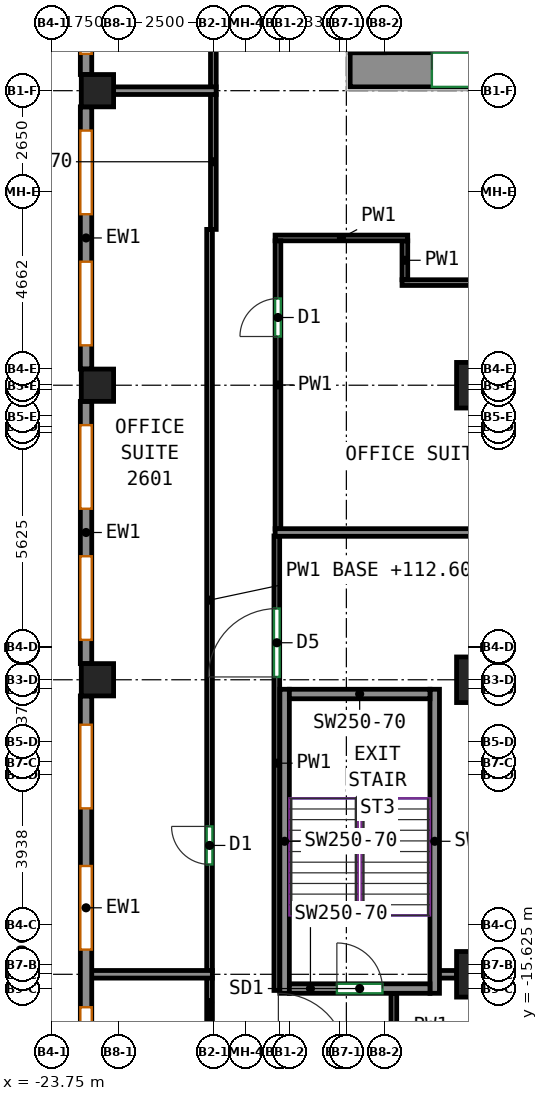
"""IFC4 building model, lengths in metres.
Left out: names, types, materials, properties, quantities, classifications, styles, units other than length and angle.
Written with IfcOpenShell. Run it as: python <this file> out.ifc"""

import sys

from ifc_helpers import new_model, si_unit, direction, frame, frame_2d, origin, origin_2d, place, context, subcontext, project, spatial, rectangle, extrude, source, transform, mapped, element, fill, save


model = new_model("IFC4")
c1 = context("Model", 3, precision=1e-05, world=origin(), true_north=direction((0.0, 1.0)))
c2 = subcontext(c1, "Body", "Model", "MODEL_VIEW")
j1 = project(units=[si_unit("LENGTHUNIT", "METRE"), si_unit("PLANEANGLEUNIT", "RADIAN")], contexts=[c1])
p1 = place(None, origin())
s1 = spatial("IfcSite", under=j1, at=p1, CompositionType="ELEMENT")
p2 = place(p1, origin())
s2 = spatial("IfcBuilding", under=s1, at=p2, CompositionType="ELEMENT")
p3 = place(p2, frame((0.0, 0.0, 112.6)))
s3 = spatial("IfcBuildingStorey", under=s2, at=p3, CompositionType="ELEMENT", Elevation=112.6)
m1 = source(origin(), c2, "Body", "SweptSolid", [
    extrude(rectangle(XDim=0.85, YDim=0.85, at=origin_2d()), origin(), (0.0, 0.0, 1.0), 3.72),
])
for number, where, z_axis, x_axis in (
    (1, (-22.55, -7.5, 0.0), (0.0, 0.0, 1.0), (1.0, 0.0, 0.0)),
    (2, (-22.55, 0.25, 0.0), (0.0, 0.0, 1.0), (1.0, 0.0, 0.0)),
    (3, (-22.55, 8.0, 0.0), (0.0, 0.0, 1.0), (1.0, 0.0, 0.0)),
):
    element("IfcColumn", number, at=place(p3, frame(where, z_axis=z_axis, x_axis=x_axis)), inside=s3, PredefinedType="COLUMN", context=c2, shape_type="MappedRepresentation", body=[
        mapped(m1, transform((0.0, 0.0, 0.0))),
    ])
m2 = source(origin(), c2, "Body", "SweptSolid", [
    extrude(rectangle(XDim=1.2, YDim=1.2, at=origin_2d()), origin(), (0.0, 0.0, 1.0), 3.72),
])
for number, where, z_axis, x_axis in (
    (4, (-12.5, -15.25, 0.0), (0.0, 0.0, 1.0), (1.0, 0.0, 0.0)),
    (5, (-12.5, -7.5, 0.0), (0.0, 0.0, 1.0), (1.0, 0.0, 0.0)),
    (6, (-12.5, 0.25, 0.0), (0.0, 0.0, 1.0), (1.0, 0.0, 0.0)),
):
    element("IfcColumn", number, at=place(p3, frame(where, z_axis=z_axis, x_axis=x_axis)), inside=s3, PredefinedType="COLUMN", context=c2, shape_type="MappedRepresentation", body=[
        mapped(m2, transform((0.0, 0.0, 0.0))),
    ])
m3 = source(origin(), c2, "Body", "SweptSolid", [
    extrude(rectangle(XDim=5.53, YDim=0.9, at=frame_2d((2.765, 0.0))), origin(), (0.0, 0.0, 1.0), 3.72),
])
p4 = place(p3, frame((-15.9, 8.55, 0.0), z_axis=(0.0, 0.0, 1.0), x_axis=(1.0, 0.0, 0.0)))
e7 = element("IfcWall", 7, at=p4, inside=s3, PredefinedType="SHEAR", context=c2, shape_type="MappedRepresentation", body=[
    mapped(m3, transform((0.0, 0.0, 0.0))),
])
p5 = place(p4, frame((2.15, 0.0, 0.0)))
e8 = element("IfcOpeningElement", 8, at=p5, cuts=e7, PredefinedType="OPENING", context=c2, shape_type="SweptSolid", body=[
    extrude(rectangle(XDim=1.2, YDim=2.1, at=frame_2d((0.6, 1.05))), frame((0.0, 0.46, 0.0), z_axis=(0.0, -1.0, 0.0), x_axis=(1.0, 0.0, 0.0)), (0.0, 0.0, 1.0), 0.92),
])
m4 = source(origin(), c2, "Body", "SweptSolid", [
    extrude(rectangle(XDim=8.0, YDim=0.25, at=frame_2d((4.0, 0.0))), origin(), (0.0, 0.0, 1.0), 3.72),
])
for number, where, z_axis, x_axis in (
    (9, (-17.625, -15.75, 0.0), (0.0, 0.0, 1.0), (0.0, 1.0, 0.0)),
    (10, (-13.675, -15.75, 0.0), (0.0, 0.0, 1.0), (0.0, 1.0, 0.0)),
):
    element("IfcWall", number, at=place(p3, frame(where, z_axis=z_axis, x_axis=x_axis)), inside=s3, PredefinedType="SHEAR", context=c2, shape_type="MappedRepresentation", body=[
        mapped(m4, transform((0.0, 0.0, 0.0))),
    ])
m5 = source(origin(), c2, "Body", "SweptSolid", [
    extrude(rectangle(XDim=3.7, YDim=0.25, at=frame_2d((1.85, 0.0))), origin(), (0.0, 0.0, 1.0), 3.72),
])
p6 = place(p3, frame((-17.5, -15.625, 0.0), z_axis=(0.0, 0.0, 1.0), x_axis=(1.0, 0.0, 0.0)))
e11 = element("IfcWall", 11, at=p6, inside=s3, PredefinedType="SHEAR", context=c2, shape_type="MappedRepresentation", body=[
    mapped(m5, transform((0.0, 0.0, 0.0))),
])
p7 = place(p6, frame((1.25, 0.0, 0.0)))
e12 = element("IfcOpeningElement", 12, at=p7, cuts=e11, PredefinedType="OPENING", context=c2, shape_type="SweptSolid", body=[
    extrude(rectangle(XDim=1.2, YDim=2.1, at=frame_2d((0.6, 1.05))), frame((0.0, 0.135, 0.0), z_axis=(0.0, -1.0, 0.0), x_axis=(1.0, 0.0, 0.0)), (0.0, 0.0, 1.0), 0.27),
])
p8 = place(p3, frame((-17.5, -7.875, 0.0), z_axis=(0.0, 0.0, 1.0), x_axis=(1.0, 0.0, 0.0)))
e13 = element("IfcWall", 13, at=p8, inside=s3, PredefinedType="SHEAR", context=c2, shape_type="MappedRepresentation", body=[
    mapped(m5, transform((0.0, 0.0, 0.0))),
])
m6 = source(origin(), c2, "Body", "SweptSolid", [
    extrude(rectangle(XDim=13.15, YDim=0.3, at=frame_2d((6.575, 0.0))), origin(), (0.0, 0.0, 1.0), 3.72),
])
p9 = place(p3, frame((-22.85, 21.575, 0.0), z_axis=(0.0, 0.0, 1.0), x_axis=(0.0, -1.0, 0.0)))
e14 = element("IfcWall", 14, at=p9, inside=s3, PredefinedType="SOLIDWALL", context=c2, shape_type="MappedRepresentation", body=[
    mapped(m6, transform((0.0, 0.0, 0.0))),
])
p10 = place(p9, frame((0.544, 0.0, 0.7)))
e15 = element("IfcOpeningElement", 15, at=p10, cuts=e14, PredefinedType="OPENING", context=c2, shape_type="SweptSolid", body=[
    extrude(rectangle(XDim=2.2, YDim=2.25, at=frame_2d((1.1, 1.125))), frame((0.0, 0.16, 0.0), z_axis=(0.0, -1.0, 0.0), x_axis=(1.0, 0.0, 0.0)), (0.0, 0.0, 1.0), 0.32),
])
p11 = place(p9, frame((3.831, 0.0, 0.7)))
e16 = element("IfcOpeningElement", 16, at=p11, cuts=e14, PredefinedType="OPENING", context=c2, shape_type="SweptSolid", body=[
    extrude(rectangle(XDim=2.2, YDim=2.25, at=frame_2d((1.1, 1.125))), frame((0.0, 0.16, 0.0), z_axis=(0.0, -1.0, 0.0), x_axis=(1.0, 0.0, 0.0)), (0.0, 0.0, 1.0), 0.32),
])
p12 = place(p9, frame((7.119, 0.0, 0.7)))
e17 = element("IfcOpeningElement", 17, at=p12, cuts=e14, PredefinedType="OPENING", context=c2, shape_type="SweptSolid", body=[
    extrude(rectangle(XDim=2.2, YDim=2.25, at=frame_2d((1.1, 1.125))), frame((0.0, 0.16, 0.0), z_axis=(0.0, -1.0, 0.0), x_axis=(1.0, 0.0, 0.0)), (0.0, 0.0, 1.0), 0.32),
])
p13 = place(p9, frame((10.406, 0.0, 0.7)))
e18 = element("IfcOpeningElement", 18, at=p13, cuts=e14, PredefinedType="OPENING", context=c2, shape_type="SweptSolid", body=[
    extrude(rectangle(XDim=2.2, YDim=2.25, at=frame_2d((1.1, 1.125))), frame((0.0, 0.16, 0.0), z_axis=(0.0, -1.0, 0.0), x_axis=(1.0, 0.0, 0.0)), (0.0, 0.0, 1.0), 0.32),
])
m7 = source(origin(), c2, "Body", "SweptSolid", [
    extrude(rectangle(XDim=6.9, YDim=0.3, at=frame_2d((3.45, 0.0))), origin(), (0.0, 0.0, 1.0), 3.72),
])
p14 = place(p3, frame((-22.85, 7.575, 0.0), z_axis=(0.0, 0.0, 1.0), x_axis=(0.0, -1.0, 0.0)))
e19 = element("IfcWall", 19, at=p14, inside=s3, PredefinedType="SOLIDWALL", context=c2, shape_type="MappedRepresentation", body=[
    mapped(m7, transform((0.0, 0.0, 0.0))),
])
p15 = place(p14, frame((0.625, 0.0, 0.7)))
e20 = element("IfcOpeningElement", 20, at=p15, cuts=e19, PredefinedType="OPENING", context=c2, shape_type="SweptSolid", body=[
    extrude(rectangle(XDim=2.2, YDim=2.25, at=frame_2d((1.1, 1.125))), frame((0.0, 0.16, 0.0), z_axis=(0.0, -1.0, 0.0), x_axis=(1.0, 0.0, 0.0)), (0.0, 0.0, 1.0), 0.32),
])
p16 = place(p14, frame((4.075, 0.0, 0.7)))
e21 = element("IfcOpeningElement", 21, at=p16, cuts=e19, PredefinedType="OPENING", context=c2, shape_type="SweptSolid", body=[
    extrude(rectangle(XDim=2.2, YDim=2.25, at=frame_2d((1.1, 1.125))), frame((0.0, 0.16, 0.0), z_axis=(0.0, -1.0, 0.0), x_axis=(1.0, 0.0, 0.0)), (0.0, 0.0, 1.0), 0.32),
])
p17 = place(p3, frame((-22.85, -0.175, 0.0), z_axis=(0.0, 0.0, 1.0), x_axis=(0.0, -1.0, 0.0)))
e22 = element("IfcWall", 22, at=p17, inside=s3, PredefinedType="SOLIDWALL", context=c2, shape_type="MappedRepresentation", body=[
    mapped(m7, transform((0.0, 0.0, 0.0))),
])
p18 = place(p17, frame((0.625, 0.0, 0.7)))
e23 = element("IfcOpeningElement", 23, at=p18, cuts=e22, PredefinedType="OPENING", context=c2, shape_type="SweptSolid", body=[
    extrude(rectangle(XDim=2.2, YDim=2.25, at=frame_2d((1.1, 1.125))), frame((0.0, 0.16, 0.0), z_axis=(0.0, -1.0, 0.0), x_axis=(1.0, 0.0, 0.0)), (0.0, 0.0, 1.0), 0.32),
])
p19 = place(p17, frame((4.075, 0.0, 0.7)))
e24 = element("IfcOpeningElement", 24, at=p19, cuts=e22, PredefinedType="OPENING", context=c2, shape_type="SweptSolid", body=[
    extrude(rectangle(XDim=2.2, YDim=2.25, at=frame_2d((1.1, 1.125))), frame((0.0, 0.16, 0.0), z_axis=(0.0, -1.0, 0.0), x_axis=(1.0, 0.0, 0.0)), (0.0, 0.0, 1.0), 0.32),
])
m8 = source(origin(), c2, "Body", "SweptSolid", [
    extrude(rectangle(XDim=11.15, YDim=0.3, at=frame_2d((5.575, 0.0))), origin(), (0.0, 0.0, 1.0), 3.72),
])
p20 = place(p3, frame((-22.85, -7.925, 0.0), z_axis=(0.0, 0.0, 1.0), x_axis=(0.0, -1.0, 0.0)))
e25 = element("IfcWall", 25, at=p20, inside=s3, PredefinedType="SOLIDWALL", context=c2, shape_type="MappedRepresentation", body=[
    mapped(m8, transform((0.0, 0.0, 0.0))),
])
p21 = place(p20, frame((0.758, 0.0, 0.7)))
e26 = element("IfcOpeningElement", 26, at=p21, cuts=e25, PredefinedType="OPENING", context=c2, shape_type="SweptSolid", body=[
    extrude(rectangle(XDim=2.2, YDim=2.25, at=frame_2d((1.1, 1.125))), frame((0.0, 0.16, 0.0), z_axis=(0.0, -1.0, 0.0), x_axis=(1.0, 0.0, 0.0)), (0.0, 0.0, 1.0), 0.32),
])
p22 = place(p20, frame((4.475, 0.0, 0.7)))
e27 = element("IfcOpeningElement", 27, at=p22, cuts=e25, PredefinedType="OPENING", context=c2, shape_type="SweptSolid", body=[
    extrude(rectangle(XDim=2.2, YDim=2.25, at=frame_2d((1.1, 1.125))), frame((0.0, 0.16, 0.0), z_axis=(0.0, -1.0, 0.0), x_axis=(1.0, 0.0, 0.0)), (0.0, 0.0, 1.0), 0.32),
])
p23 = place(p20, frame((8.192, 0.0, 0.7)))
e28 = element("IfcOpeningElement", 28, at=p23, cuts=e25, PredefinedType="OPENING", context=c2, shape_type="SweptSolid", body=[
    extrude(rectangle(XDim=2.2, YDim=2.25, at=frame_2d((1.1, 1.125))), frame((0.0, 0.16, 0.0), z_axis=(0.0, -1.0, 0.0), x_axis=(1.0, 0.0, 0.0)), (0.0, 0.0, 1.0), 0.32),
])
p24 = place(p3, frame((-19.6, -15.16, 0.0), z_axis=(0.0, 0.0, 1.0), x_axis=(0.0, 1.0, 0.0)))
e29 = element("IfcWall", 29, at=p24, inside=s3, PredefinedType="PARTITIONING", context=c2, shape_type="SweptSolid", body=[
    extrude(rectangle(XDim=19.51, YDim=0.15, at=frame_2d((9.755, 0.0))), origin(), (0.0, 0.0, 1.0), 3.07),
])
p25 = place(p24, frame((2.801, 0.0, 0.0)))
e30 = element("IfcOpeningElement", 30, at=p25, cuts=e29, PredefinedType="OPENING", context=c2, shape_type="SweptSolid", body=[
    extrude(rectangle(XDim=1.0, YDim=2.1, at=frame_2d((0.5, 1.05))), frame((0.0, 0.085, 0.0), z_axis=(0.0, -1.0, 0.0), x_axis=(1.0, 0.0, 0.0)), (0.0, 0.0, 1.0), 0.17),
])
p26 = place(p3, frame((-19.5, 4.35, 0.0), z_axis=(0.0, 0.0, 1.0), x_axis=(0.0, 1.0, 0.0)))
e31 = element("IfcWall", 31, at=p26, inside=s3, PredefinedType="PARTITIONING", context=c2, shape_type="SweptSolid", body=[
    extrude(rectangle(XDim=3.56, YDim=0.15, at=frame_2d((1.78, 0.0))), origin(), (0.0, 0.0, 1.0), 3.07),
])
p27 = place(p3, frame((-14.535, 2.95, 0.0), z_axis=(0.0, 0.0, 1.0), x_axis=(1.0, 0.0, 0.0)))
e32 = element("IfcWall", 32, at=p27, inside=s3, PredefinedType="PARTITIONING", context=c2, shape_type="SweptSolid", body=[
    extrude(rectangle(XDim=12.635, YDim=0.15, at=frame_2d((6.317, 0.0))), origin(), (0.0, 0.0, 1.0), 3.72),
])
p28 = place(p27, frame((10.333, 0.0, 0.0)))
e33 = element("IfcOpeningElement", 33, at=p28, cuts=e32, PredefinedType="OPENING", context=c2, shape_type="SweptSolid", body=[
    extrude(rectangle(XDim=0.9, YDim=2.1, at=frame_2d((0.45, 1.05))), frame((0.0, 0.085, 0.0), z_axis=(0.0, -1.0, 0.0), x_axis=(1.0, 0.0, 0.0)), (0.0, 0.0, 1.0), 0.17),
])
p29 = place(p3, frame((-14.46, 4.05, 0.0), z_axis=(0.0, 0.0, 1.0), x_axis=(0.0, -1.0, 0.0)))
e34 = element("IfcWall", 34, at=p29, inside=s3, PredefinedType="PARTITIONING", context=c2, shape_type="SweptSolid", body=[
    extrude(rectangle(XDim=1.025, YDim=0.15, at=frame_2d((0.513, 0.0))), origin(), (0.0, 0.0, 1.0), 3.72),
])
p30 = place(p3, frame((-17.875, 4.125, 0.0), z_axis=(0.0, 0.0, 1.0), x_axis=(1.0, 0.0, 0.0)))
e35 = element("IfcWall", 35, at=p30, inside=s3, PredefinedType="PARTITIONING", context=c2, shape_type="SweptSolid", body=[
    extrude(rectangle(XDim=3.49, YDim=0.15, at=frame_2d((1.745, 0.0))), origin(), (0.0, 0.0, 1.0), 3.72),
])
p31 = place(p3, frame((-17.8, -3.535, 0.0), z_axis=(0.0, 0.0, 1.0), x_axis=(0.0, 1.0, 0.0)))
e36 = element("IfcWall", 36, at=p31, inside=s3, PredefinedType="PARTITIONING", context=c2, shape_type="SweptSolid", body=[
    extrude(rectangle(XDim=7.585, YDim=0.15, at=frame_2d((3.792, 0.0))), origin(), (0.0, 0.0, 1.0), 3.72),
])
p32 = place(p31, frame((5.067, 0.0, 0.0)))
e37 = element("IfcOpeningElement", 37, at=p32, cuts=e36, PredefinedType="OPENING", context=c2, shape_type="SweptSolid", body=[
    extrude(rectangle(XDim=1.0, YDim=2.1, at=frame_2d((0.5, 1.05))), frame((0.0, 0.085, 0.0), z_axis=(0.0, -1.0, 0.0), x_axis=(1.0, 0.0, 0.0)), (0.0, 0.0, 1.0), 0.17),
])
p33 = place(p3, frame((-17.83, -15.675, 0.0), z_axis=(0.0, 0.0, 1.0), x_axis=(0.0, 1.0, 0.0)))
e38 = element("IfcWall", 38, at=p33, inside=s3, PredefinedType="PARTITIONING", context=c2, shape_type="SweptSolid", body=[
    extrude(rectangle(XDim=11.96, YDim=0.15, at=frame_2d((5.98, 0.0))), origin(), (0.0, 0.0, 1.0), 3.72),
])
p34 = place(p33, frame((8.249, 0.0, 0.0)))
e39 = element("IfcOpeningElement", 39, at=p34, cuts=e38, PredefinedType="OPENING", context=c2, shape_type="SweptSolid", body=[
    extrude(rectangle(XDim=1.8, YDim=2.1, at=frame_2d((0.9, 1.05))), frame((0.0, 0.085, 0.0), z_axis=(0.0, -1.0, 0.0), x_axis=(1.0, 0.0, 0.0)), (0.0, 0.0, 1.0), 0.17),
])
p35 = place(p3, frame((-19.6, -16.648, 0.0), z_axis=(0.0, 0.0, 1.0), x_axis=(0.0, 1.0, 0.0)))
e40 = element("IfcWall", 40, at=p35, inside=s3, PredefinedType="PARTITIONING", context=c2, shape_type="SweptSolid", body=[
    extrude(rectangle(XDim=1.308, YDim=0.15, at=frame_2d((0.654, 0.0))), origin(), (0.0, 0.0, 1.0), 3.07),
])
p36 = place(p3, frame((-14.75, -17.475, 0.0), z_axis=(0.0, 0.0, 1.0), x_axis=(0.0, 1.0, 0.0)))
e41 = element("IfcWall", 41, at=p36, inside=s3, PredefinedType="PARTITIONING", context=c2, shape_type="SweptSolid", body=[
    extrude(rectangle(XDim=1.725, YDim=0.15, at=frame_2d((0.863, 0.0))), origin(), (0.0, 0.0, 1.0), 3.72),
])
p37 = place(p3, frame((-19.5, 8.09, 0.0), z_axis=(0.0, 0.0, 1.0), x_axis=(0.0, 1.0, 0.0)))
e42 = element("IfcWall", 42, at=p37, inside=s3, PredefinedType="PARTITIONING", context=c2, shape_type="SweptSolid", body=[
    extrude(rectangle(XDim=13.82, YDim=0.15, at=frame_2d((6.91, 0.0))), origin(), (0.0, 0.0, 1.0), 3.07),
])
p38 = place(p37, frame((9.214, 0.0, 0.0)))
e43 = element("IfcOpeningElement", 43, at=p38, cuts=e42, PredefinedType="OPENING", context=c2, shape_type="SweptSolid", body=[
    extrude(rectangle(XDim=0.9, YDim=2.1, at=frame_2d((0.45, 1.05))), frame((0.0, 0.085, 0.0), z_axis=(0.0, -1.0, 0.0), x_axis=(1.0, 0.0, 0.0)), (0.0, 0.0, 1.0), 0.17),
])
p39 = place(p3, frame((-22.75, -15.25, 0.0), z_axis=(0.0, 0.0, 1.0), x_axis=(1.0, 0.0, 0.0)))
e44 = element("IfcWall", 44, at=p39, inside=s3, PredefinedType="PARTITIONING", context=c2, shape_type="SweptSolid", body=[
    extrude(rectangle(XDim=3.224, YDim=0.2, at=frame_2d((1.612, 0.0))), origin(), (0.0, 0.0, 1.0), 3.72),
])
p40 = place(p3, frame((-22.125, 8.0, 0.0), z_axis=(0.0, 0.0, 1.0), x_axis=(1.0, 0.0, 0.0)))
e45 = element("IfcWall", 45, at=p40, inside=s3, PredefinedType="PARTITIONING", context=c2, shape_type="SweptSolid", body=[
    extrude(rectangle(XDim=2.699, YDim=0.2, at=frame_2d((1.35, 0.0))), origin(), (0.0, 0.0, 1.0), 3.72),
])
p41 = place(p3, frame((-17.874, -3.625, 0.0), z_axis=(0.0, 0.0, 1.0), x_axis=(1.0, 0.0, 0.0)))
e46 = element("IfcWall", 46, at=p41, inside=s3, PredefinedType="PARTITIONING", context=c2, shape_type="SweptSolid", body=[
    extrude(rectangle(XDim=33.474, YDim=0.2, at=frame_2d((16.737, 0.0))), origin(), (0.0, 0.0, 1.0), 3.72),
])
p42 = place(p3, frame((-13.6, -15.25, 0.0), z_axis=(0.0, 0.0, 1.0), x_axis=(1.0, 0.0, 0.0)))
e47 = element("IfcWall", 47, at=p42, inside=s3, PredefinedType="PARTITIONING", context=c2, shape_type="SweptSolid", body=[
    extrude(rectangle(XDim=0.5, YDim=0.2, at=frame_2d((0.25, 0.0))), origin(), (0.0, 0.0, 1.0), 3.72),
])
p43 = place(p13, origin())
e48 = element("IfcWindow", 48, at=p43, inside=s3, PartitioningType="SINGLE_PANEL", PredefinedType="WINDOW", context=c2, shape_type="SweptSolid", body=[
    extrude(rectangle(XDim=2.2, YDim=2.25, at=frame_2d((1.1, 1.125))), frame((0.0, 0.03, 0.0), z_axis=(0.0, -1.0, 0.0), x_axis=(1.0, 0.0, 0.0)), (0.0, 0.0, 1.0), 0.06),
])
fill(e18, e48)
p44 = place(p15, origin())
e49 = element("IfcWindow", 49, at=p44, inside=s3, PartitioningType="SINGLE_PANEL", PredefinedType="WINDOW", context=c2, shape_type="SweptSolid", body=[
    extrude(rectangle(XDim=2.2, YDim=2.25, at=frame_2d((1.1, 1.125))), frame((0.0, 0.03, 0.0), z_axis=(0.0, -1.0, 0.0), x_axis=(1.0, 0.0, 0.0)), (0.0, 0.0, 1.0), 0.06),
])
fill(e20, e49)
p45 = place(p16, origin())
e50 = element("IfcWindow", 50, at=p45, inside=s3, PartitioningType="SINGLE_PANEL", PredefinedType="WINDOW", context=c2, shape_type="SweptSolid", body=[
    extrude(rectangle(XDim=2.2, YDim=2.25, at=frame_2d((1.1, 1.125))), frame((0.0, 0.03, 0.0), z_axis=(0.0, -1.0, 0.0), x_axis=(1.0, 0.0, 0.0)), (0.0, 0.0, 1.0), 0.06),
])
fill(e21, e50)
p46 = place(p18, origin())
e51 = element("IfcWindow", 51, at=p46, inside=s3, PartitioningType="SINGLE_PANEL", PredefinedType="WINDOW", context=c2, shape_type="SweptSolid", body=[
    extrude(rectangle(XDim=2.2, YDim=2.25, at=frame_2d((1.1, 1.125))), frame((0.0, 0.03, 0.0), z_axis=(0.0, -1.0, 0.0), x_axis=(1.0, 0.0, 0.0)), (0.0, 0.0, 1.0), 0.06),
])
fill(e23, e51)
p47 = place(p19, origin())
e52 = element("IfcWindow", 52, at=p47, inside=s3, PartitioningType="SINGLE_PANEL", PredefinedType="WINDOW", context=c2, shape_type="SweptSolid", body=[
    extrude(rectangle(XDim=2.2, YDim=2.25, at=frame_2d((1.1, 1.125))), frame((0.0, 0.03, 0.0), z_axis=(0.0, -1.0, 0.0), x_axis=(1.0, 0.0, 0.0)), (0.0, 0.0, 1.0), 0.06),
])
fill(e24, e52)
p48 = place(p21, origin())
e53 = element("IfcWindow", 53, at=p48, inside=s3, PartitioningType="SINGLE_PANEL", PredefinedType="WINDOW", context=c2, shape_type="SweptSolid", body=[
    extrude(rectangle(XDim=2.2, YDim=2.25, at=frame_2d((1.1, 1.125))), frame((0.0, 0.03, 0.0), z_axis=(0.0, -1.0, 0.0), x_axis=(1.0, 0.0, 0.0)), (0.0, 0.0, 1.0), 0.06),
])
fill(e26, e53)
p49 = place(p22, origin())
e54 = element("IfcWindow", 54, at=p49, inside=s3, PartitioningType="SINGLE_PANEL", PredefinedType="WINDOW", context=c2, shape_type="SweptSolid", body=[
    extrude(rectangle(XDim=2.2, YDim=2.25, at=frame_2d((1.1, 1.125))), frame((0.0, 0.03, 0.0), z_axis=(0.0, -1.0, 0.0), x_axis=(1.0, 0.0, 0.0)), (0.0, 0.0, 1.0), 0.06),
])
fill(e27, e54)
p50 = place(p23, origin())
e55 = element("IfcWindow", 55, at=p50, inside=s3, PartitioningType="SINGLE_PANEL", PredefinedType="WINDOW", context=c2, shape_type="SweptSolid", body=[
    extrude(rectangle(XDim=2.2, YDim=2.25, at=frame_2d((1.1, 1.125))), frame((0.0, 0.03, 0.0), z_axis=(0.0, -1.0, 0.0), x_axis=(1.0, 0.0, 0.0)), (0.0, 0.0, 1.0), 0.06),
])
fill(e28, e55)
p51 = place(p5, origin())
e56 = element("IfcDoor", 56, at=p51, inside=s3, OperationType="DOUBLE_DOOR_SINGLE_SWING", PredefinedType="DOOR", context=c2, shape_type="SweptSolid", body=[
    extrude(rectangle(XDim=1.2, YDim=2.1, at=frame_2d((0.6, 1.05))), frame((0.0, 0.355, 0.0), z_axis=(0.0, -1.0, 0.0), x_axis=(1.0, 0.0, 0.0)), (0.0, 0.0, 1.0), 0.05),
])
fill(e8, e56)
p52 = place(p7, origin())
e57 = element("IfcDoor", 57, at=p52, inside=s3, OperationType="DOUBLE_DOOR_SINGLE_SWING", PredefinedType="DOOR", context=c2, shape_type="SweptSolid", body=[
    extrude(rectangle(XDim=1.2, YDim=2.1, at=frame_2d((0.6, 1.05))), frame((0.0, 0.025, 0.0), z_axis=(0.0, -1.0, 0.0), x_axis=(1.0, 0.0, 0.0)), (0.0, 0.0, 1.0), 0.05),
])
fill(e12, e57)
p53 = place(p25, origin())
e58 = element("IfcDoor", 58, at=p53, inside=s3, OperationType="SINGLE_SWING_RIGHT", PredefinedType="DOOR", context=c2, shape_type="SweptSolid", body=[
    extrude(rectangle(XDim=1.0, YDim=2.1, at=frame_2d((0.5, 1.05))), frame((0.0, 0.025, 0.0), z_axis=(0.0, -1.0, 0.0), x_axis=(1.0, 0.0, 0.0)), (0.0, 0.0, 1.0), 0.05),
])
fill(e30, e58)
p54 = place(p34, origin())
e59 = element("IfcDoor", 59, at=p54, inside=s3, OperationType="DOUBLE_DOOR_SINGLE_SWING", PredefinedType="DOOR", context=c2, shape_type="SweptSolid", body=[
    extrude(rectangle(XDim=1.8, YDim=2.1, at=frame_2d((0.9, 1.05))), frame((0.0, 0.025, 0.0), z_axis=(0.0, -1.0, 0.0), x_axis=(1.0, 0.0, 0.0)), (0.0, 0.0, 1.0), 0.05),
])
fill(e39, e59)
p55 = place(p32, origin())
e60 = element("IfcDoor", 60, at=p55, inside=s3, OperationType="SINGLE_SWING_LEFT", PredefinedType="DOOR", context=c2, shape_type="SweptSolid", body=[
    extrude(rectangle(XDim=1.0, YDim=2.1, at=frame_2d((0.5, 1.05))), frame((0.0, 0.025, 0.0), z_axis=(0.0, -1.0, 0.0), x_axis=(1.0, 0.0, 0.0)), (0.0, 0.0, 1.0), 0.05),
])
fill(e37, e60)
save(model, sys.argv[1])
